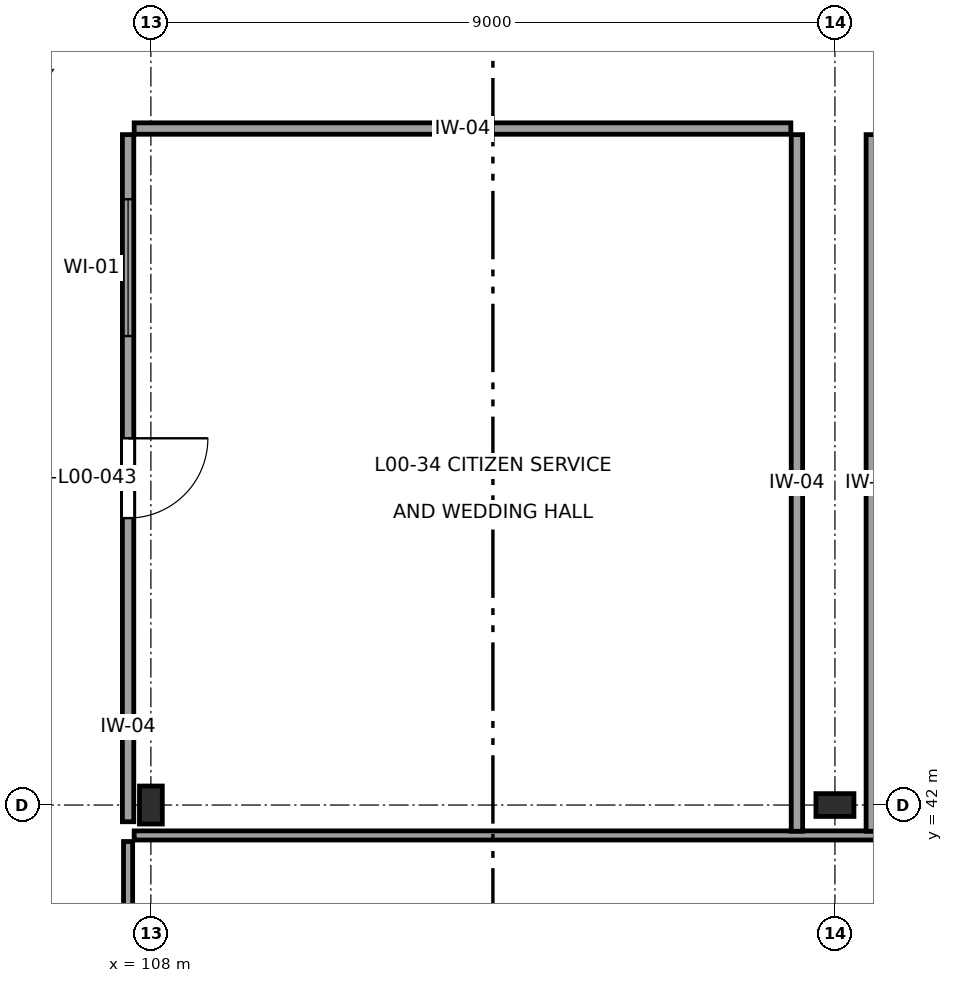
"""IFC4 building model, lengths in metres.
Left out: names, types, materials, properties, quantities, classifications, styles, units other than length and angle.
Written with IfcOpenShell. Run it as: python <this file> out.ifc"""

import sys

from ifc_helpers import new_model, si_unit, direction, frame, frame_2d, origin, origin_2d, place, context, subcontext, project, spatial, rectangle, i_section, extrude, element, fill, save


model = new_model("IFC4")
c1 = context("Model", 3, precision=1e-05, world=origin(), true_north=direction((0.0, 1.0)))
c2 = subcontext(c1, "Body", "Model", "MODEL_VIEW")
j1 = project(units=[si_unit("LENGTHUNIT", "METRE"), si_unit("PLANEANGLEUNIT", "RADIAN")], contexts=[c1])
p1 = place(None, origin())
s1 = spatial("IfcSite", under=j1, at=p1, CompositionType="ELEMENT")
p2 = place(p1, origin())
s2 = spatial("IfcBuilding", under=s1, at=p2, CompositionType="ELEMENT")
p3 = place(p2, origin())
s3 = spatial("IfcBuildingStorey", under=s2, at=p3, CompositionType="ELEMENT", Elevation=0.0)
for number, where, z_axis, x_axis in (
    (1, (108.0, 42.0, 0.0), (0.0, 0.0, 1.0), (1.0, 0.0, 0.0)),
    (2, (117.0, 42.0, 0.0), (0.0, 0.0, 1.0), (0.0, 1.0, 0.0)),
):
    element("IfcColumn", number, at=place(p3, frame(where, z_axis=z_axis, x_axis=x_axis)), inside=s3, PredefinedType="COLUMN", context=c2, shape_type="SweptSolid", body=[
        extrude(i_section(OverallWidth=0.3, OverallDepth=0.5, WebThickness=0.014, FlangeThickness=0.028, at=origin_2d()), origin(), (0.0, 0.0, 1.0), 5.4),
    ])
p4 = place(p3, frame((107.7, 24.48, 0.0), z_axis=(0.0, 0.0, 1.0), x_axis=(0.0, 1.0, 0.0)))
e3 = element("IfcWall", 3, at=p4, inside=s3, PredefinedType="PARTITIONING", context=c2, shape_type="SweptSolid", body=[
    extrude(rectangle(XDim=17.04, YDim=0.12, at=frame_2d((8.52, 0.0))), origin(), (0.0, 0.0, 1.0), 5.04),
])
p5 = place(p4, frame((8.07, 0.0, 0.0)))
e4 = element("IfcOpeningElement", 4, at=p5, cuts=e3, PredefinedType="OPENING", context=c2, shape_type="SweptSolid", body=[
    extrude(rectangle(XDim=0.9, YDim=2.1, at=frame_2d((0.45, 1.05))), frame((0.0, 0.075, 0.0), z_axis=(0.0, -1.0, 0.0), x_axis=(1.0, 0.0, 0.0)), (0.0, 0.0, 1.0), 0.15),
])
p6 = place(p4, frame((14.09, 0.0, 1.05)))
e5 = element("IfcOpeningElement", 5, at=p6, cuts=e3, PredefinedType="OPENING", context=c2, shape_type="SweptSolid", body=[
    extrude(rectangle(XDim=2.1, YDim=1.2, at=frame_2d((1.05, 0.6))), frame((0.0, 0.075, 0.0), z_axis=(0.0, -1.0, 0.0), x_axis=(1.0, 0.0, 0.0)), (0.0, 0.0, 1.0), 0.15),
])
p7 = place(p3, frame((107.78, 41.6, 0.0), z_axis=(0.0, 0.0, 1.0), x_axis=(1.0, 0.0, 0.0)))
e6 = element("IfcWall", 6, at=p7, inside=s3, PredefinedType="PARTITIONING", context=c2, shape_type="SweptSolid", body=[
    extrude(rectangle(XDim=36.212, YDim=0.12, at=frame_2d((18.106, 0.0))), origin(), (0.0, 0.0, 1.0), 5.04),
])
p8 = place(p3, frame((107.78, 50.9, 0.0), z_axis=(0.0, 0.0, 1.0), x_axis=(1.0, 0.0, 0.0)))
e7 = element("IfcWall", 7, at=p8, inside=s3, PredefinedType="PARTITIONING", context=c2, shape_type="SweptSolid", body=[
    extrude(rectangle(XDim=8.64, YDim=0.15, at=frame_2d((4.32, 0.0))), origin(), (0.0, 0.0, 1.0), 5.04),
])
p9 = place(p3, frame((116.5, 50.82, 0.0), z_axis=(0.0, 0.0, 1.0), x_axis=(0.0, -1.0, 0.0)))
e8 = element("IfcWall", 8, at=p9, inside=s3, PredefinedType="PARTITIONING", context=c2, shape_type="SweptSolid", body=[
    extrude(rectangle(XDim=9.165, YDim=0.15, at=frame_2d((4.583, 0.0))), origin(), (0.0, 0.0, 1.0), 5.04),
])
p10 = place(p3, frame((107.7, 41.78, 0.0), z_axis=(0.0, 0.0, 1.0), x_axis=(0.0, 1.0, 0.0)))
e9 = element("IfcWall", 9, at=p10, inside=s3, PredefinedType="PARTITIONING", context=c2, shape_type="SweptSolid", body=[
    extrude(rectangle(XDim=9.04, YDim=0.15, at=frame_2d((4.52, 0.0))), origin(), (0.0, 0.0, 1.0), 5.04),
])
p11 = place(p10, frame((3.995, 0.0, 0.0)))
e10 = element("IfcOpeningElement", 10, at=p11, cuts=e9, PredefinedType="OPENING", context=c2, shape_type="SweptSolid", body=[
    extrude(rectangle(XDim=1.05, YDim=2.25, at=frame_2d((0.525, 1.125))), frame((0.0, 0.09, 0.0), z_axis=(0.0, -1.0, 0.0), x_axis=(1.0, 0.0, 0.0)), (0.0, 0.0, 1.0), 0.18),
])
p12 = place(p10, frame((6.39, 0.0, 1.05)))
e11 = element("IfcOpeningElement", 11, at=p12, cuts=e9, PredefinedType="OPENING", context=c2, shape_type="SweptSolid", body=[
    extrude(rectangle(XDim=1.8, YDim=1.1, at=frame_2d((0.9, 0.55))), frame((0.0, 0.09, 0.0), z_axis=(0.0, -1.0, 0.0), x_axis=(1.0, 0.0, 0.0)), (0.0, 0.0, 1.0), 0.18),
])
p13 = place(p3, frame((117.5, 41.655, 0.0), z_axis=(0.0, 0.0, 1.0), x_axis=(0.0, 1.0, 0.0)))
e12 = element("IfcWall", 12, at=p13, inside=s3, PredefinedType="PARTITIONING", context=c2, shape_type="SweptSolid", body=[
    extrude(rectangle(XDim=9.165, YDim=0.18, at=frame_2d((4.583, 0.0))), origin(), (0.0, 0.0, 1.0), 5.04),
])
p14 = place(p11, frame((1.05, 0.0, 0.0), z_axis=(0.0, 0.0, 1.0), x_axis=(-1.0, 0.0, 0.0)))
e13 = element("IfcDoor", 13, at=p14, inside=s3, OperationType="SINGLE_SWING_RIGHT", PredefinedType="DOOR", context=c2, shape_type="SweptSolid", body=[
    extrude(rectangle(XDim=1.05, YDim=2.25, at=frame_2d((0.525, 1.125))), frame((0.0, 0.025, 0.0), z_axis=(0.0, -1.0, 0.0), x_axis=(1.0, 0.0, 0.0)), (0.0, 0.0, 1.0), 0.05),
])
fill(e10, e13)
p15 = place(p12, origin())
e14 = element("IfcWindow", 14, at=p15, inside=s3, PartitioningType="SINGLE_PANEL", PredefinedType="WINDOW", context=c2, shape_type="SweptSolid", body=[
    extrude(rectangle(XDim=1.8, YDim=1.1, at=frame_2d((0.9, 0.55))), frame((0.0, 0.03, 0.0), z_axis=(0.0, -1.0, 0.0), x_axis=(1.0, 0.0, 0.0)), (0.0, 0.0, 1.0), 0.06),
])
fill(e11, e14)
save(model, sys.argv[1])
